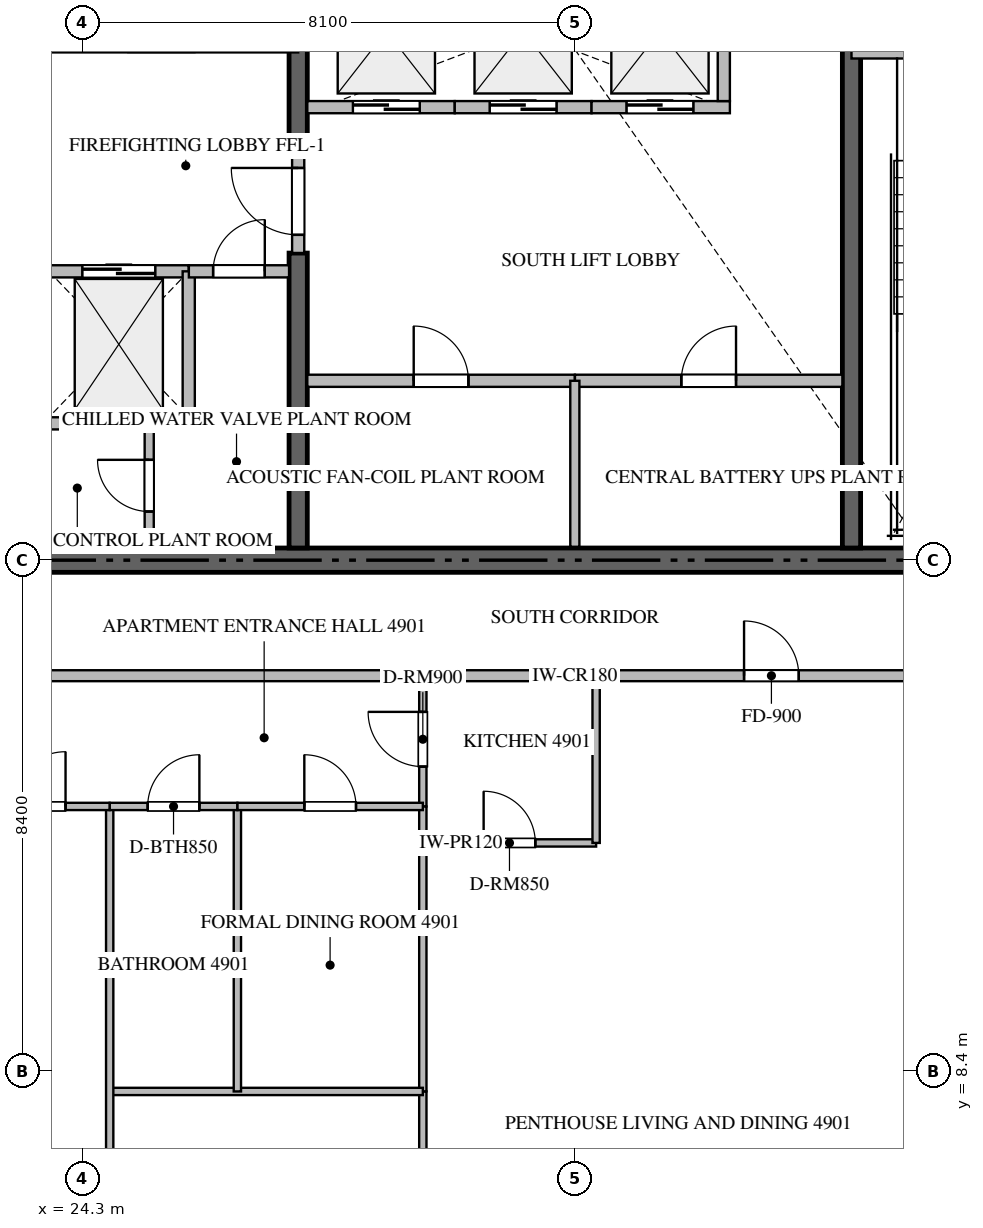
"""IFC4 building model, lengths in metres.
Left out: names, types, materials, properties, quantities, classifications, styles, units other than length and angle.
Written with IfcOpenShell. Run it as: python <this file> out.ifc"""

import sys

from ifc_helpers import new_model, si_unit, direction, frame, frame_2d, origin, place, context, subcontext, project, spatial, rectangle, extrude, source, transform, mapped, element, fill, save


model = new_model("IFC4")
c1 = context("Model", 3, precision=1e-05, world=origin(), true_north=direction((0.0, 1.0)))
c2 = subcontext(c1, "Body", "Model", "MODEL_VIEW")
j1 = project(units=[si_unit("LENGTHUNIT", "METRE"), si_unit("PLANEANGLEUNIT", "RADIAN")], contexts=[c1])
p1 = place(None, origin())
s1 = spatial("IfcSite", under=j1, at=p1, CompositionType="ELEMENT")
p2 = place(p1, origin())
s2 = spatial("IfcBuilding", under=s1, at=p2, CompositionType="ELEMENT")
p3 = place(p2, frame((0.0, 0.0, 195.15)))
s3 = spatial("IfcBuildingStorey", under=s2, at=p3, CompositionType="ELEMENT", Elevation=195.15)
p4 = place(p3, frame((23.4, 16.8, -0.26), z_axis=(0.0, 0.0, 1.0), x_axis=(1.0, 0.0, 0.0)))
e1 = element("IfcWall", 1, at=p4, inside=s3, PredefinedType="SHEAR", context=c2, shape_type="SweptSolid", body=[
    extrude(rectangle(XDim=18.0, YDim=0.4, at=frame_2d((9.0, 0.0))), origin(), (0.0, 0.0, 1.0), 3.568),
])
p5 = place(p3, frame((27.85, 17.0, -0.26), z_axis=(0.0, 0.0, 1.0), x_axis=(0.0, 1.0, 0.0)))
e2 = element("IfcWall", 2, at=p5, inside=s3, PredefinedType="SHEAR", context=c2, shape_type="SweptSolid", body=[
    extrude(rectangle(XDim=4.85, YDim=0.3, at=frame_2d((2.425, 0.0))), origin(), (0.0, 0.0, 1.0), 3.568),
])
p6 = place(p3, frame((27.85, 23.55, -0.26), z_axis=(0.0, 0.0, 1.0), x_axis=(0.0, 1.0, 0.0)))
e3 = element("IfcWall", 3, at=p6, inside=s3, PredefinedType="SHEAR", context=c2, shape_type="SweptSolid", body=[
    extrude(rectangle(XDim=9.85, YDim=0.3, at=frame_2d((4.925, 0.0))), origin(), (0.0, 0.0, 1.0), 3.568),
])
p7 = place(p3, frame((36.95, 17.0, -0.26), z_axis=(0.0, 0.0, 1.0), x_axis=(0.0, 1.0, 0.0)))
e4 = element("IfcWall", 4, at=p7, inside=s3, PredefinedType="SHEAR", context=c2, shape_type="SweptSolid", body=[
    extrude(rectangle(XDim=8.35, YDim=0.3, at=frame_2d((4.175, 0.0))), origin(), (0.0, 0.0, 1.0), 3.568),
])
p8 = place(p3, frame((36.95, 25.15, 0.0), z_axis=(0.0, 0.0, 1.0), x_axis=(1.0, 0.0, 0.0)))
e5 = element("IfcWall", 5, at=p8, inside=s3, PredefinedType="STANDARD", context=c2, shape_type="SweptSolid", body=[
    extrude(rectangle(XDim=4.45, YDim=0.2, at=frame_2d((2.225, 0.0))), origin(), (0.0, 0.0, 1.0), 3.31),
])
p9 = place(p8, frame((1.65, 0.0, 0.0)))
e6 = element("IfcOpeningElement", 6, at=p9, cuts=e5, PredefinedType="OPENING", context=c2, shape_type="SweptSolid", body=[
    extrude(rectangle(XDim=1.1, YDim=2.15, at=frame_2d((0.55, 1.075))), frame((0.0, 0.11, 0.0), z_axis=(0.0, -1.0, 0.0), x_axis=(1.0, 0.0, 0.0)), (0.0, 0.0, 1.0), 0.22),
])
p10 = place(p3, frame((23.6, 21.55, 0.0), z_axis=(0.0, 0.0, 1.0), x_axis=(1.0, 0.0, 0.0)))
e7 = element("IfcWall", 7, at=p10, inside=s3, PredefinedType="STANDARD", context=c2, shape_type="SweptSolid", body=[
    extrude(rectangle(XDim=2.45, YDim=0.2, at=frame_2d((1.225, 0.0))), origin(), (0.0, 0.0, 1.0), 3.31),
])
p11 = place(p10, frame((0.7, 0.0, 0.0)))
e8 = element("IfcOpeningElement", 8, at=p11, cuts=e7, PredefinedType="OPENING", context=c2, shape_type="SweptSolid", body=[
    extrude(rectangle(XDim=1.2, YDim=2.2, at=frame_2d((0.6, 1.1))), frame((0.0, 0.11, 0.0), z_axis=(0.0, -1.0, 0.0), x_axis=(1.0, 0.0, 0.0)), (0.0, 0.0, 1.0), 0.22),
])
p12 = place(p3, frame((28.0, 24.25, 0.0), z_axis=(0.0, 0.0, 1.0), x_axis=(1.0, 0.0, 0.0)))
e9 = element("IfcWall", 9, at=p12, inside=s3, PredefinedType="STANDARD", context=c2, shape_type="SweptSolid", body=[
    extrude(rectangle(XDim=2.425, YDim=0.2, at=frame_2d((1.212, 0.0))), origin(), (0.0, 0.0, 1.0), 3.31),
])
p13 = place(p12, frame((0.75, 0.0, 0.0)))
e10 = element("IfcOpeningElement", 10, at=p13, cuts=e9, PredefinedType="OPENING", context=c2, shape_type="SweptSolid", body=[
    extrude(rectangle(XDim=1.1, YDim=2.2, at=frame_2d((0.55, 1.1))), frame((0.0, 0.11, 0.0), z_axis=(0.0, -1.0, 0.0), x_axis=(1.0, 0.0, 0.0)), (0.0, 0.0, 1.0), 0.22),
])
p14 = place(p3, frame((30.425, 24.25, 0.0), z_axis=(0.0, 0.0, 1.0), x_axis=(1.0, 0.0, 0.0)))
e11 = element("IfcWall", 11, at=p14, inside=s3, PredefinedType="STANDARD", context=c2, shape_type="SweptSolid", body=[
    extrude(rectangle(XDim=2.25, YDim=0.2, at=frame_2d((1.125, 0.0))), origin(), (0.0, 0.0, 1.0), 3.31),
])
p15 = place(p14, frame((0.575, 0.0, 0.0)))
e12 = element("IfcOpeningElement", 12, at=p15, cuts=e11, PredefinedType="OPENING", context=c2, shape_type="SweptSolid", body=[
    extrude(rectangle(XDim=1.1, YDim=2.2, at=frame_2d((0.55, 1.1))), frame((0.0, 0.11, 0.0), z_axis=(0.0, -1.0, 0.0), x_axis=(1.0, 0.0, 0.0)), (0.0, 0.0, 1.0), 0.22),
])
p16 = place(p3, frame((32.675, 24.25, 0.0), z_axis=(0.0, 0.0, 1.0), x_axis=(1.0, 0.0, 0.0)))
e13 = element("IfcWall", 13, at=p16, inside=s3, PredefinedType="STANDARD", context=c2, shape_type="SweptSolid", body=[
    extrude(rectangle(XDim=2.275, YDim=0.2, at=frame_2d((1.137, 0.0))), origin(), (0.0, 0.0, 1.0), 3.31),
])
p17 = place(p16, frame((0.575, 0.0, 0.0)))
e14 = element("IfcOpeningElement", 14, at=p17, cuts=e13, PredefinedType="OPENING", context=c2, shape_type="SweptSolid", body=[
    extrude(rectangle(XDim=1.1, YDim=2.2, at=frame_2d((0.55, 1.1))), frame((0.0, 0.11, 0.0), z_axis=(0.0, -1.0, 0.0), x_axis=(1.0, 0.0, 0.0)), (0.0, 0.0, 1.0), 0.22),
])
for number, where, z_axis, x_axis in (
    (15, (34.85, 24.35, 0.0), (0.0, 0.0, 1.0), (0.0, 1.0, 0.0)),
    (16, (26.05, 19.05, 0.0), (0.0, 0.0, 1.0), (0.0, 1.0, 0.0)),
):
    element("IfcWall", number, at=place(p3, frame(where, z_axis=z_axis, x_axis=x_axis)), inside=s3, PredefinedType="STANDARD", context=c2, shape_type="SweptSolid", body=[
        extrude(rectangle(XDim=2.5, YDim=0.2, at=frame_2d((1.25, 0.0))), origin(), (0.0, 0.0, 1.0), 3.31),
    ])
p18 = place(p3, frame((23.6, 19.05, 0.0), z_axis=(0.0, 0.0, 1.0), x_axis=(1.0, 0.0, 0.0)))
e17 = element("IfcWall", 17, at=p18, inside=s3, PredefinedType="STANDARD", context=c2, shape_type="SweptSolid", body=[
    extrude(rectangle(XDim=2.45, YDim=0.2, at=frame_2d((1.225, 0.0))), origin(), (0.0, 0.0, 1.0), 3.31),
])
p19 = place(p3, frame((26.052, 21.55, 0.0), z_axis=(0.0, 0.0, 1.0), x_axis=(1.0, 0.0, 0.0)))
e18 = element("IfcWall", 18, at=p19, inside=s3, PredefinedType="STANDARD", context=c2, shape_type="SweptSolid", body=[
    extrude(rectangle(XDim=1.648, YDim=0.2, at=frame_2d((0.824, 0.0))), origin(), (0.0, 0.0, 1.0), 3.31),
])
p20 = place(p19, frame((0.399, 0.0, 0.0)))
e19 = element("IfcOpeningElement", 19, at=p20, cuts=e18, PredefinedType="OPENING", context=c2, shape_type="SweptSolid", body=[
    extrude(rectangle(XDim=0.85, YDim=2.1, at=frame_2d((0.425, 1.05))), frame((0.0, 0.11, 0.0), z_axis=(0.0, -1.0, 0.0), x_axis=(1.0, 0.0, 0.0)), (0.0, 0.0, 1.0), 0.22),
])
p21 = place(p3, frame((27.85, 21.852, 0.0), z_axis=(0.0, 0.0, 1.0), x_axis=(0.0, 1.0, 0.0)))
e20 = element("IfcWall", 20, at=p21, inside=s3, PredefinedType="STANDARD", context=c2, shape_type="SweptSolid", body=[
    extrude(rectangle(XDim=1.696, YDim=0.2, at=frame_2d((0.848, 0.0))), origin(), (0.0, 0.0, 1.0), 3.31),
])
p22 = place(p21, frame((0.298, 0.0, 0.0)))
e21 = element("IfcOpeningElement", 21, at=p22, cuts=e20, PredefinedType="OPENING", context=c2, shape_type="SweptSolid", body=[
    extrude(rectangle(XDim=1.1, YDim=2.15, at=frame_2d((0.55, 1.075))), frame((0.0, 0.11, 0.0), z_axis=(0.0, -1.0, 0.0), x_axis=(1.0, 0.0, 0.0)), (0.0, 0.0, 1.0), 0.22),
])
p23 = place(p3, frame((25.4, 17.0, 0.0), z_axis=(0.0, 0.0, 1.0), x_axis=(0.0, 1.0, 0.0)))
e22 = element("IfcWall", 22, at=p23, inside=s3, PredefinedType="PARTITIONING", context=c2, shape_type="SweptSolid", body=[
    extrude(rectangle(XDim=2.05, YDim=0.15, at=frame_2d((1.025, 0.0))), origin(), (0.0, 0.0, 1.0), 3.31),
])
p24 = place(p23, frame((0.6, 0.0, 0.0)))
e23 = element("IfcOpeningElement", 23, at=p24, cuts=e22, PredefinedType="OPENING", context=c2, shape_type="SweptSolid", body=[
    extrude(rectangle(XDim=0.85, YDim=2.1, at=frame_2d((0.425, 1.05))), frame((0.0, 0.085, 0.0), z_axis=(0.0, -1.0, 0.0), x_axis=(1.0, 0.0, 0.0)), (0.0, 0.0, 1.0), 0.17),
])
p25 = place(p3, frame((28.0, 19.75, 0.0), z_axis=(0.0, 0.0, 1.0), x_axis=(1.0, 0.0, 0.0)))
e24 = element("IfcWall", 24, at=p25, inside=s3, PredefinedType="STANDARD", context=c2, shape_type="SweptSolid", body=[
    extrude(rectangle(XDim=4.4, YDim=0.2, at=frame_2d((2.2, 0.0))), origin(), (0.0, 0.0, 1.0), 3.31),
])
p26 = place(p25, frame((1.75, 0.0, 0.0)))
e25 = element("IfcOpeningElement", 25, at=p26, cuts=e24, PredefinedType="OPENING", context=c2, shape_type="SweptSolid", body=[
    extrude(rectangle(XDim=0.9, YDim=2.1, at=frame_2d((0.45, 1.05))), frame((0.0, 0.11, 0.0), z_axis=(0.0, -1.0, 0.0), x_axis=(1.0, 0.0, 0.0)), (0.0, 0.0, 1.0), 0.22),
])
p27 = place(p3, frame((32.402, 19.75, 0.0), z_axis=(0.0, 0.0, 1.0), x_axis=(1.0, 0.0, 0.0)))
e26 = element("IfcWall", 26, at=p27, inside=s3, PredefinedType="STANDARD", context=c2, shape_type="SweptSolid", body=[
    extrude(rectangle(XDim=4.398, YDim=0.2, at=frame_2d((2.199, 0.0))), origin(), (0.0, 0.0, 1.0), 3.31),
])
p28 = place(p27, frame((1.749, 0.0, 0.0)))
e27 = element("IfcOpeningElement", 27, at=p28, cuts=e26, PredefinedType="OPENING", context=c2, shape_type="SweptSolid", body=[
    extrude(rectangle(XDim=0.9, YDim=2.1, at=frame_2d((0.45, 1.05))), frame((0.0, 0.11, 0.0), z_axis=(0.0, -1.0, 0.0), x_axis=(1.0, 0.0, 0.0)), (0.0, 0.0, 1.0), 0.22),
])
p29 = place(p3, frame((32.4, 17.02, 0.0), z_axis=(0.0, 0.0, 1.0), x_axis=(0.0, 1.0, 0.0)))
e28 = element("IfcWall", 28, at=p29, inside=s3, PredefinedType="PARTITIONING", context=c2, shape_type="SweptSolid", body=[
    extrude(rectangle(XDim=2.73, YDim=0.15, at=frame_2d((1.365, 0.0))), origin(), (0.0, 0.0, 1.0), 3.31),
])
p30 = place(p3, frame((20.952, 14.9, 0.0), z_axis=(0.0, 0.0, 1.0), x_axis=(1.0, 0.0, 0.0)))
e29 = element("IfcWall", 29, at=p30, inside=s3, PredefinedType="PARTITIONING", context=c2, shape_type="SweptSolid", body=[
    extrude(rectangle(XDim=22.896, YDim=0.18, at=frame_2d((11.448, 0.0))), origin(), (0.0, 0.0, 1.0), 2.145),
])
p31 = place(p30, frame((14.231, 0.0, 0.0)))
e30 = element("IfcOpeningElement", 30, at=p31, cuts=e29, PredefinedType="OPENING", context=c2, shape_type="SweptSolid", body=[
    extrude(rectangle(XDim=0.9, YDim=2.1, at=frame_2d((0.45, 1.05))), frame((0.0, 0.1, 0.0), z_axis=(0.0, -1.0, 0.0), x_axis=(1.0, 0.0, 0.0)), (0.0, 0.0, 1.0), 0.2),
])
p32 = place(p30, frame((19.203, 0.0, 0.0)))
e31 = element("IfcOpeningElement", 31, at=p32, cuts=e29, PredefinedType="OPENING", context=c2, shape_type="SweptSolid", body=[
    extrude(rectangle(XDim=0.9, YDim=2.1, at=frame_2d((0.45, 1.05))), frame((0.0, 0.1, 0.0), z_axis=(0.0, -1.0, 0.0), x_axis=(1.0, 0.0, 0.0)), (0.0, 0.0, 1.0), 0.2),
])
p33 = place(p3, frame((29.9, 12.15, 0.0), z_axis=(0.0, 0.0, 1.0), x_axis=(1.0, 0.0, 0.0)))
e32 = element("IfcWall", 32, at=p33, inside=s3, PredefinedType="PARTITIONING", context=c2, shape_type="SweptSolid", body=[
    extrude(rectangle(XDim=2.85, YDim=0.12, at=frame_2d((1.425, 0.0))), origin(), (0.0, 0.0, 1.0), 3.31),
])
p34 = place(p33, frame((1.0, 0.0, 0.0)))
e33 = element("IfcOpeningElement", 33, at=p34, cuts=e32, PredefinedType="OPENING", context=c2, shape_type="SweptSolid", body=[
    extrude(rectangle(XDim=0.85, YDim=2.1, at=frame_2d((0.425, 1.05))), frame((0.0, 0.07, 0.0), z_axis=(0.0, -1.0, 0.0), x_axis=(1.0, 0.0, 0.0)), (0.0, 0.0, 1.0), 0.14),
])
p35 = place(p3, frame((32.75, 12.15, 0.0), z_axis=(0.0, 0.0, 1.0), x_axis=(0.0, 1.0, 0.0)))
e34 = element("IfcWall", 34, at=p35, inside=s3, PredefinedType="PARTITIONING", context=c2, shape_type="SweptSolid", body=[
    extrude(rectangle(XDim=2.81, YDim=0.12, at=frame_2d((1.405, 0.0))), origin(), (0.0, 0.0, 1.0), 3.31),
])
p36 = place(p3, frame((29.9, 12.75, 0.0), z_axis=(0.0, 0.0, 1.0), x_axis=(0.0, 1.0, 0.0)))
e35 = element("IfcWall", 35, at=p36, inside=s3, PredefinedType="PARTITIONING", context=c2, shape_type="SweptSolid", body=[
    extrude(rectangle(XDim=2.21, YDim=0.12, at=frame_2d((1.105, 0.0))), origin(), (0.0, 0.0, 1.0), 3.31),
])
p37 = place(p36, frame((0.655, 0.0, 0.0)))
e36 = element("IfcOpeningElement", 36, at=p37, cuts=e35, PredefinedType="OPENING", context=c2, shape_type="SweptSolid", body=[
    extrude(rectangle(XDim=0.9, YDim=2.1, at=frame_2d((0.45, 1.05))), frame((0.0, 0.07, 0.0), z_axis=(0.0, -1.0, 0.0), x_axis=(1.0, 0.0, 0.0)), (0.0, 0.0, 1.0), 0.14),
])
p38 = place(p3, frame((29.9, 1.495, 0.0), z_axis=(0.0, 0.0, 1.0), x_axis=(0.0, 1.0, 0.0)))
e37 = element("IfcWall", 37, at=p38, inside=s3, PredefinedType="PARTITIONING", context=c2, shape_type="SweptSolid", body=[
    extrude(rectangle(XDim=6.568, YDim=0.12, at=frame_2d((3.284, 0.0))), origin(), (0.0, 0.0, 1.0), 3.31),
])
p39 = place(p38, frame((3.117, 0.0, 0.0)))
e38 = element("IfcOpeningElement", 38, at=p39, cuts=e37, PredefinedType="OPENING", context=c2, shape_type="SweptSolid", body=[
    extrude(rectangle(XDim=0.9, YDim=2.1, at=frame_2d((0.45, 1.05))), frame((0.0, 0.07, 0.0), z_axis=(0.0, -1.0, 0.0), x_axis=(1.0, 0.0, 0.0)), (0.0, 0.0, 1.0), 0.14),
])
p40 = place(p3, frame((29.9, 8.065, 0.0), z_axis=(0.0, 0.0, 1.0), x_axis=(0.0, 1.0, 0.0)))
e39 = element("IfcWall", 39, at=p40, inside=s3, PredefinedType="PARTITIONING", context=c2, shape_type="SweptSolid", body=[
    extrude(rectangle(XDim=4.683, YDim=0.12, at=frame_2d((2.342, 0.0))), origin(), (0.0, 0.0, 1.0), 3.31),
])
p41 = place(p3, frame((24.75, 8.063, 0.0), z_axis=(0.0, 0.0, 1.0), x_axis=(1.0, 0.0, 0.0)))
e40 = element("IfcWall", 40, at=p41, inside=s3, PredefinedType="PARTITIONING", context=c2, shape_type="SweptSolid", body=[
    extrude(rectangle(XDim=5.15, YDim=0.12, at=frame_2d((2.575, 0.0))), origin(), (0.0, 0.0, 1.0), 3.31),
])
p42 = place(p3, frame((24.75, 1.495, 0.0), z_axis=(0.0, 0.0, 1.0), x_axis=(0.0, 1.0, 0.0)))
e41 = element("IfcWall", 41, at=p42, inside=s3, PredefinedType="PARTITIONING", context=c2, shape_type="SweptSolid", body=[
    extrude(rectangle(XDim=11.255, YDim=0.12, at=frame_2d((5.627, 0.0))), origin(), (0.0, 0.0, 1.0), 3.31),
])
p43 = place(p3, frame((26.85, 8.063, 0.0), z_axis=(0.0, 0.0, 1.0), x_axis=(0.0, 1.0, 0.0)))
e42 = element("IfcWall", 42, at=p43, inside=s3, PredefinedType="PARTITIONING", context=c2, shape_type="SweptSolid", body=[
    extrude(rectangle(XDim=4.687, YDim=0.12, at=frame_2d((2.344, 0.0))), origin(), (0.0, 0.0, 1.0), 3.31),
])
p44 = place(p3, frame((24.75, 12.75, 0.0), z_axis=(0.0, 0.0, 1.0), x_axis=(1.0, 0.0, 0.0)))
e43 = element("IfcWall", 43, at=p44, inside=s3, PredefinedType="PARTITIONING", context=c2, shape_type="SweptSolid", body=[
    extrude(rectangle(XDim=2.1, YDim=0.12, at=frame_2d((1.05, 0.0))), origin(), (0.0, 0.0, 1.0), 3.31),
])
p45 = place(p44, frame((0.625, 0.0, 0.0)))
e44 = element("IfcOpeningElement", 44, at=p45, cuts=e43, PredefinedType="OPENING", context=c2, shape_type="SweptSolid", body=[
    extrude(rectangle(XDim=0.85, YDim=2.1, at=frame_2d((0.425, 1.05))), frame((0.0, 0.07, 0.0), z_axis=(0.0, -1.0, 0.0), x_axis=(1.0, 0.0, 0.0)), (0.0, 0.0, 1.0), 0.14),
])
p46 = place(p3, frame((26.852, 12.75, 0.0), z_axis=(0.0, 0.0, 1.0), x_axis=(1.0, 0.0, 0.0)))
e45 = element("IfcWall", 45, at=p46, inside=s3, PredefinedType="PARTITIONING", context=c2, shape_type="SweptSolid", body=[
    extrude(rectangle(XDim=3.048, YDim=0.12, at=frame_2d((1.524, 0.0))), origin(), (0.0, 0.0, 1.0), 3.31),
])
p47 = place(p46, frame((1.099, 0.0, 0.0)))
e46 = element("IfcOpeningElement", 46, at=p47, cuts=e45, PredefinedType="OPENING", context=c2, shape_type="SweptSolid", body=[
    extrude(rectangle(XDim=0.85, YDim=2.1, at=frame_2d((0.425, 1.05))), frame((0.0, 0.07, 0.0), z_axis=(0.0, -1.0, 0.0), x_axis=(1.0, 0.0, 0.0)), (0.0, 0.0, 1.0), 0.14),
])
p48 = place(p3, frame((22.4, 12.75, 0.0), z_axis=(0.0, 0.0, 1.0), x_axis=(1.0, 0.0, 0.0)))
e47 = element("IfcWall", 47, at=p48, inside=s3, PredefinedType="PARTITIONING", context=c2, shape_type="SweptSolid", body=[
    extrude(rectangle(XDim=2.348, YDim=0.12, at=frame_2d((1.174, 0.0))), origin(), (0.0, 0.0, 1.0), 3.31),
])
p49 = place(p48, frame((0.724, 0.0, 0.0)))
e48 = element("IfcOpeningElement", 48, at=p49, cuts=e47, PredefinedType="OPENING", context=c2, shape_type="SweptSolid", body=[
    extrude(rectangle(XDim=0.9, YDim=2.1, at=frame_2d((0.45, 1.05))), frame((0.0, 0.07, 0.0), z_axis=(0.0, -1.0, 0.0), x_axis=(1.0, 0.0, 0.0)), (0.0, 0.0, 1.0), 0.14),
])
m1 = source(origin(), c2, "Body", "SweptSolid", [
    extrude(rectangle(XDim=1.2, YDim=2.2, at=frame_2d((0.6, 1.1))), frame((0.0, 0.025, 0.0), z_axis=(0.0, -1.0, 0.0), x_axis=(1.0, 0.0, 0.0)), (0.0, 0.0, 1.0), 0.05),
])
p50 = place(p11, origin())
e49 = element("IfcDoor", 49, at=p50, inside=s3, OperationType="DOUBLE_DOOR_SLIDING", PredefinedType="DOOR", context=c2, shape_type="MappedRepresentation", body=[
    mapped(m1, transform((0.0, 0.0, 0.0), scale=1.0)),
])
fill(e8, e49)
m2 = source(origin(), c2, "Body", "SweptSolid", [
    extrude(rectangle(XDim=1.1, YDim=2.2, at=frame_2d((0.55, 1.1))), frame((0.0, 0.025, 0.0), z_axis=(0.0, -1.0, 0.0), x_axis=(1.0, 0.0, 0.0)), (0.0, 0.0, 1.0), 0.05),
])
p51 = place(p13, origin())
e50 = element("IfcDoor", 50, at=p51, inside=s3, OperationType="DOUBLE_DOOR_SLIDING", PredefinedType="DOOR", context=c2, shape_type="MappedRepresentation", body=[
    mapped(m2, transform((0.0, 0.0, 0.0), scale=1.0)),
])
fill(e10, e50)
p52 = place(p15, origin())
e51 = element("IfcDoor", 51, at=p52, inside=s3, OperationType="DOUBLE_DOOR_SLIDING", PredefinedType="DOOR", context=c2, shape_type="MappedRepresentation", body=[
    mapped(m2, transform((0.0, 0.0, 0.0), scale=1.0)),
])
fill(e12, e51)
p53 = place(p17, origin())
e52 = element("IfcDoor", 52, at=p53, inside=s3, OperationType="DOUBLE_DOOR_SLIDING", PredefinedType="DOOR", context=c2, shape_type="MappedRepresentation", body=[
    mapped(m2, transform((0.0, 0.0, 0.0), scale=1.0)),
])
fill(e14, e52)
m3 = source(origin(), c2, "Body", "SweptSolid", [
    extrude(rectangle(XDim=0.85, YDim=2.1, at=frame_2d((0.425, 1.05))), frame((0.0, 0.025, 0.0), z_axis=(0.0, -1.0, 0.0), x_axis=(1.0, 0.0, 0.0)), (0.0, 0.0, 1.0), 0.05),
])
p54 = place(p20, origin())
e53 = element("IfcDoor", 53, at=p54, inside=s3, OperationType="SINGLE_SWING_RIGHT", PredefinedType="DOOR", context=c2, shape_type="MappedRepresentation", body=[
    mapped(m3, transform((0.0, 0.0, 0.0), scale=1.0)),
])
fill(e19, e53)
m4 = source(origin(), c2, "Body", "SweptSolid", [
    extrude(rectangle(XDim=1.1, YDim=2.15, at=frame_2d((0.55, 1.075))), frame((0.0, 0.025, 0.0), z_axis=(0.0, -1.0, 0.0), x_axis=(1.0, 0.0, 0.0)), (0.0, 0.0, 1.0), 0.05),
])
p55 = place(p22, origin())
e54 = element("IfcDoor", 54, at=p55, inside=s3, OperationType="SINGLE_SWING_RIGHT", PredefinedType="DOOR", context=c2, shape_type="MappedRepresentation", body=[
    mapped(m4, transform((0.0, 0.0, 0.0), scale=1.0)),
])
fill(e21, e54)
p56 = place(p24, origin())
e55 = element("IfcDoor", 55, at=p56, inside=s3, OperationType="SINGLE_SWING_RIGHT", PredefinedType="DOOR", context=c2, shape_type="MappedRepresentation", body=[
    mapped(m3, transform((0.0, 0.0, 0.0), scale=1.0)),
])
fill(e23, e55)
m5 = source(origin(), c2, "Body", "SweptSolid", [
    extrude(rectangle(XDim=0.9, YDim=2.1, at=frame_2d((0.45, 1.05))), frame((0.0, 0.025, 0.0), z_axis=(0.0, -1.0, 0.0), x_axis=(1.0, 0.0, 0.0)), (0.0, 0.0, 1.0), 0.05),
])
p57 = place(p26, origin())
e56 = element("IfcDoor", 56, at=p57, inside=s3, OperationType="SINGLE_SWING_LEFT", PredefinedType="DOOR", context=c2, shape_type="MappedRepresentation", body=[
    mapped(m5, transform((0.0, 0.0, 0.0), scale=1.0)),
])
fill(e25, e56)
p58 = place(p28, origin())
e57 = element("IfcDoor", 57, at=p58, inside=s3, OperationType="SINGLE_SWING_RIGHT", PredefinedType="DOOR", context=c2, shape_type="MappedRepresentation", body=[
    mapped(m5, transform((0.0, 0.0, 0.0), scale=1.0)),
])
fill(e27, e57)
p59 = place(p31, origin())
e58 = element("IfcDoor", 58, at=p59, inside=s3, OperationType="SINGLE_SWING_LEFT", PredefinedType="DOOR", context=c2, shape_type="MappedRepresentation", body=[
    mapped(m5, transform((0.0, 0.0, 0.0), scale=1.0)),
])
fill(e30, e58)
p60 = place(p34, origin())
e59 = element("IfcDoor", 59, at=p60, inside=s3, OperationType="SINGLE_SWING_LEFT", PredefinedType="DOOR", context=c2, shape_type="MappedRepresentation", body=[
    mapped(m3, transform((0.0, 0.0, 0.0), scale=1.0)),
])
fill(e33, e59)
p61 = place(p37, origin())
e60 = element("IfcDoor", 60, at=p61, inside=s3, OperationType="SINGLE_SWING_RIGHT", PredefinedType="DOOR", context=c2, shape_type="MappedRepresentation", body=[
    mapped(m5, transform((0.0, 0.0, 0.0), scale=1.0)),
])
fill(e36, e60)
p62 = place(p45, origin())
e61 = element("IfcDoor", 61, at=p62, inside=s3, OperationType="SINGLE_SWING_RIGHT", PredefinedType="DOOR", context=c2, shape_type="MappedRepresentation", body=[
    mapped(m3, transform((0.0, 0.0, 0.0), scale=1.0)),
])
fill(e44, e61)
p63 = place(p47, origin())
e62 = element("IfcDoor", 62, at=p63, inside=s3, OperationType="SINGLE_SWING_LEFT", PredefinedType="DOOR", context=c2, shape_type="MappedRepresentation", body=[
    mapped(m3, transform((0.0, 0.0, 0.0), scale=1.0)),
])
fill(e46, e62)
p64 = place(p49, origin())
e63 = element("IfcDoor", 63, at=p64, inside=s3, OperationType="SINGLE_SWING_RIGHT", PredefinedType="DOOR", context=c2, shape_type="MappedRepresentation", body=[
    mapped(m5, transform((0.0, 0.0, 0.0), scale=1.0)),
])
fill(e48, e63)
save(model, sys.argv[1])
